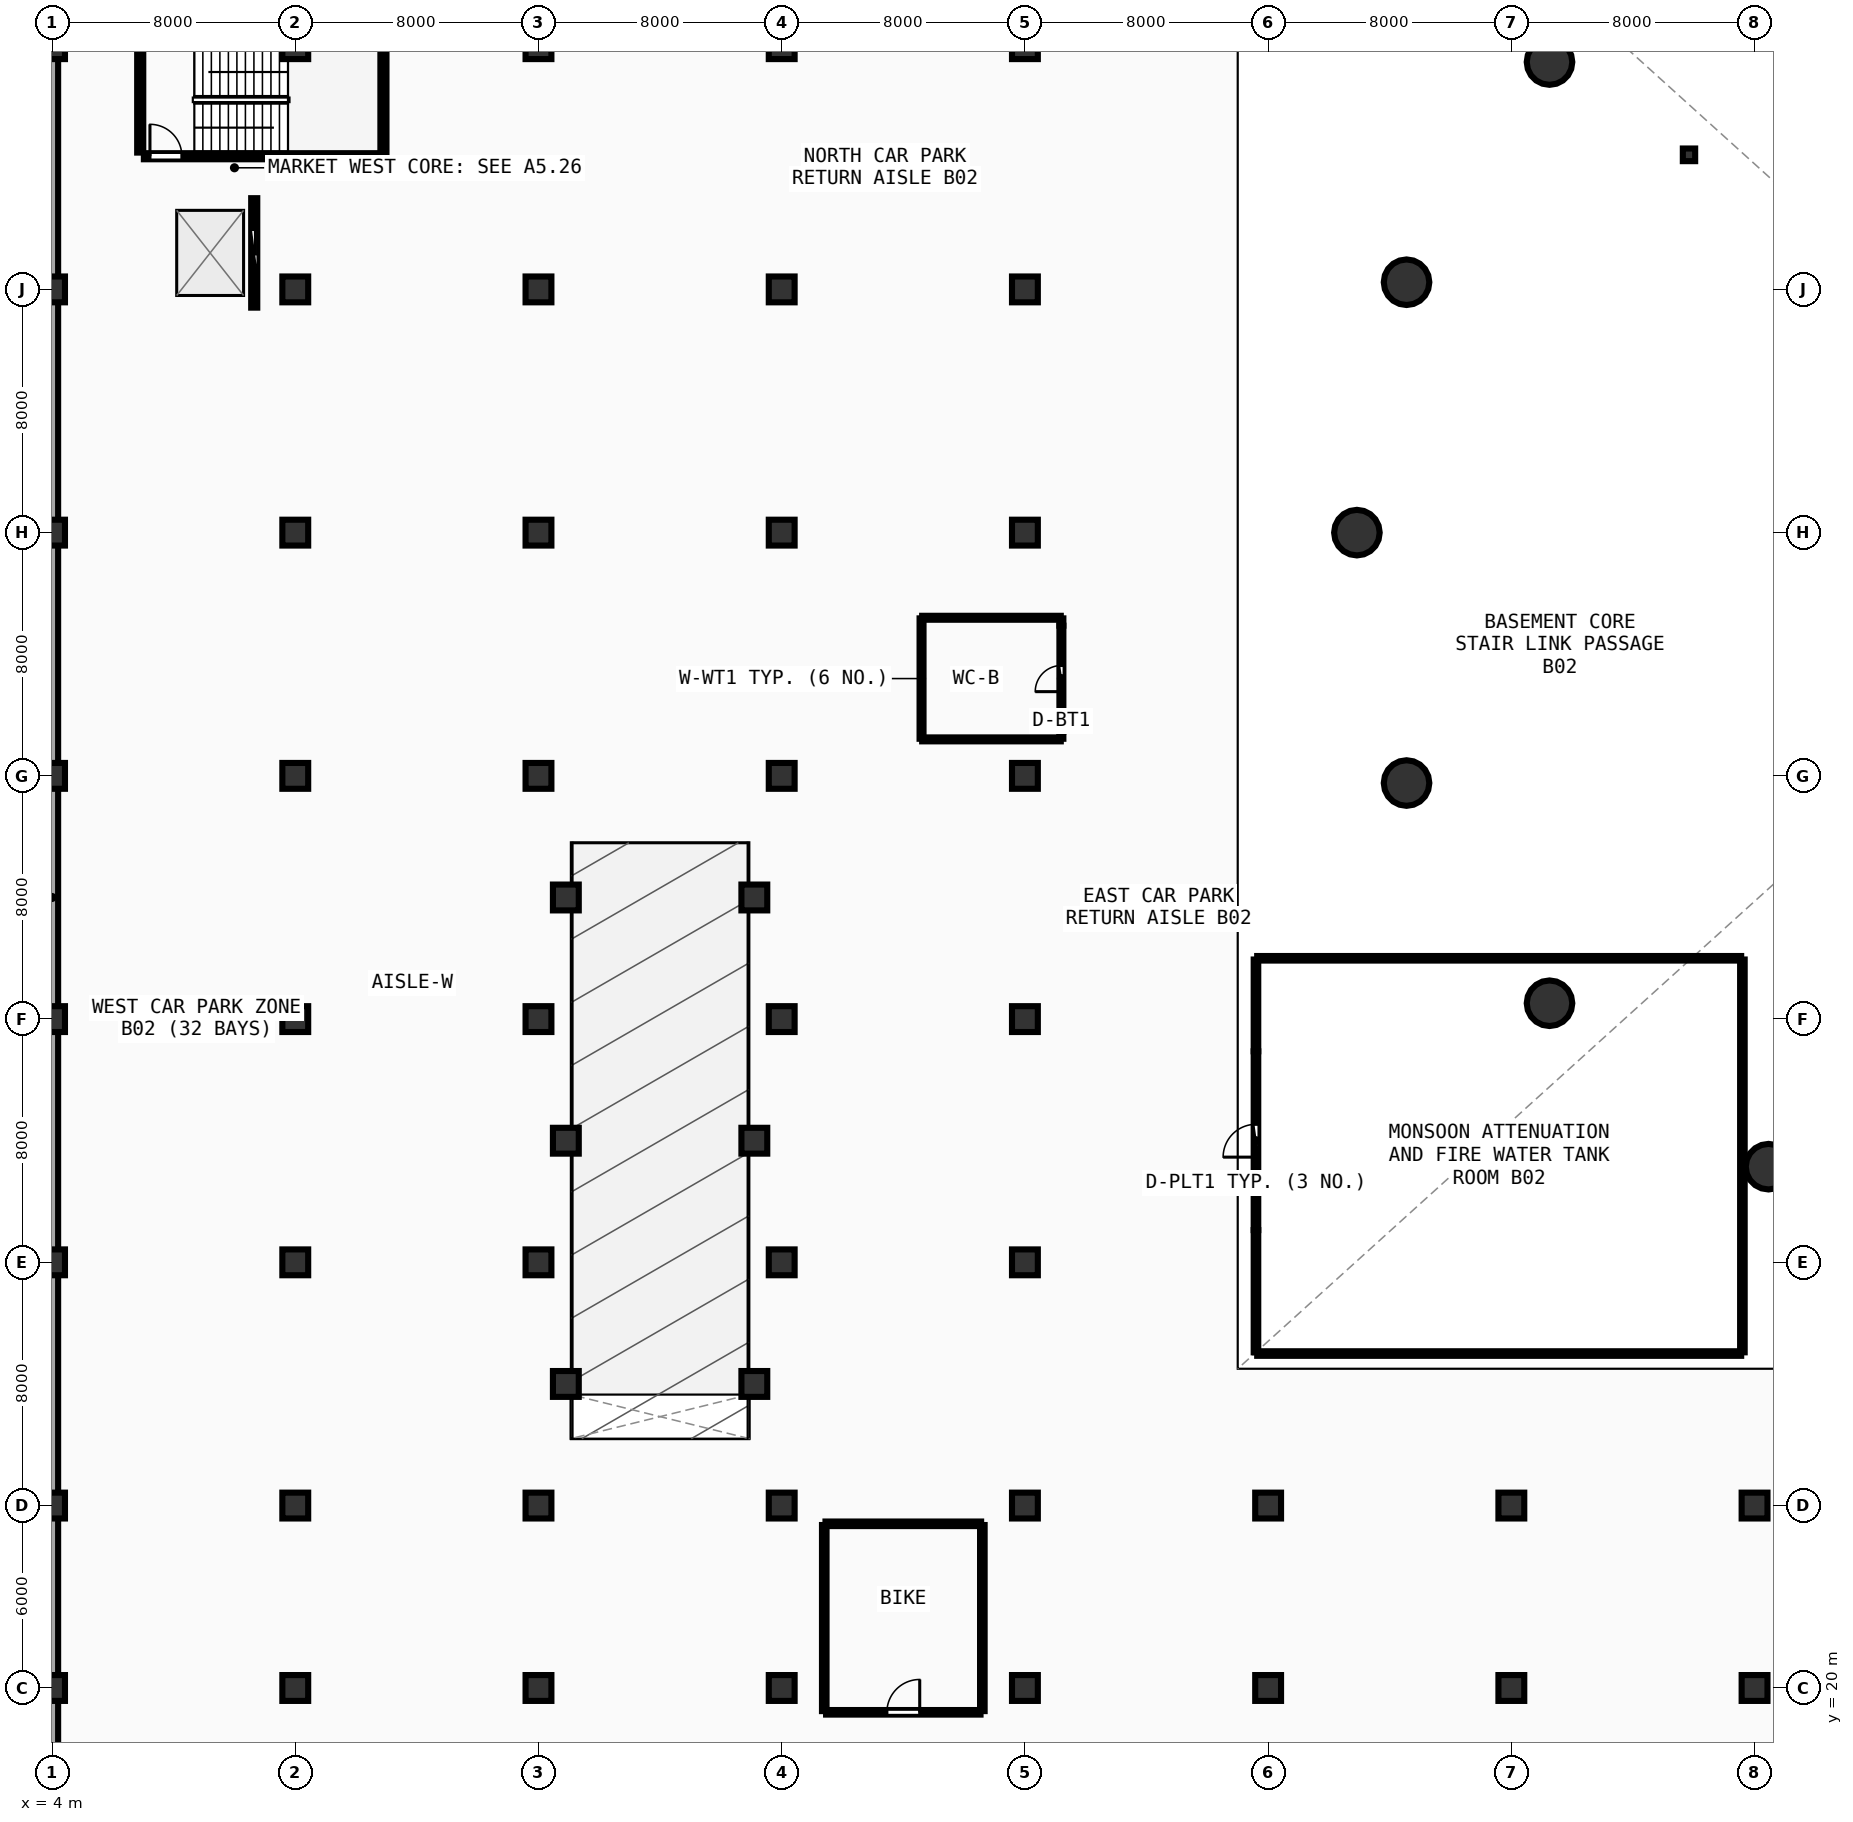
"""IFC4 building model, lengths in metres.
Left out: names, types, materials, properties, quantities, classifications, styles, units other than length and angle.
Written with IfcOpenShell. Run it as: python <this file> out.ifc"""

import sys

from ifc_helpers import new_model, si_unit, direction, frame, frame_2d, origin, origin_2d, place, context, subcontext, project, spatial, rectangle, circle, i_section, extrude, element, fill, save


model = new_model("IFC4")
c1 = context("Model", 3, precision=1e-05, world=origin(), true_north=direction((0.0, 1.0)))
c2 = subcontext(c1, "Body", "Model", "MODEL_VIEW")
j1 = project(units=[si_unit("LENGTHUNIT", "METRE"), si_unit("PLANEANGLEUNIT", "RADIAN")], contexts=[c1])
p1 = place(None, origin())
s1 = spatial("IfcSite", under=j1, at=p1, CompositionType="ELEMENT")
p2 = place(p1, origin())
s2 = spatial("IfcBuilding", under=s1, at=p2, CompositionType="ELEMENT")
p3 = place(p2, frame((0.0, 0.0, -8.4)))
s3 = spatial("IfcBuildingStorey", under=s2, at=p3, CompositionType="ELEMENT", Elevation=-8.4)
for number, where, z_axis, x_axis in (
    (1, (53.256, 73.478, 0.0), (0.0, 0.0, 1.0), (1.0, 0.0, 0.0)),
    (2, (48.553, 66.236, 0.0), (0.0, 0.0, 1.0), (1.0, 0.0, 0.0)),
    (3, (46.92, 58.0, 0.0), (0.0, 0.0, 1.0), (1.0, 0.0, 0.0)),
    (4, (48.553, 49.764, 0.0), (0.0, 0.0, 1.0), (1.0, 0.0, 0.0)),
    (5, (53.256, 42.522, 0.0), (0.0, 0.0, 1.0), (1.0, 0.0, 0.0)),
    (6, (60.46, 37.146, 0.0), (0.0, 0.0, 1.0), (1.0, 0.0, 0.0)),
):
    element("IfcColumn", number, at=place(p3, frame(where, z_axis=z_axis, x_axis=x_axis)), inside=s3, PredefinedType="COLUMN", context=c2, shape_type="SweptSolid", body=[
        extrude(circle(Radius=0.75, at=origin_2d()), origin(), (0.0, 0.0, 1.0), 4.2),
    ])
p4 = place(p3, frame((57.844, 70.426, 0.0), z_axis=(0.0, 0.0, 1.0), x_axis=(1.0, 0.0, 0.0)))
e7 = element("IfcColumn", 7, at=p4, inside=s3, PredefinedType="COLUMN", context=c2, shape_type="SweptSolid", body=[
    extrude(i_section(OverallWidth=0.406, OverallDepth=0.416, WebThickness=0.029, FlangeThickness=0.048, FilletRadius=0.015, at=origin_2d()), origin(), (0.0, 0.0, 1.0), 4.2),
])
for number, where, z_axis, x_axis in (
    (8, (4.0, 20.0, 0.0), (0.0, 0.0, 1.0), (1.0, 0.0, 0.0)),
    (9, (4.0, 26.0, 0.0), (0.0, 0.0, 1.0), (1.0, 0.0, 0.0)),
    (10, (4.0, 34.0, 0.0), (0.0, 0.0, 1.0), (1.0, 0.0, 0.0)),
    (11, (4.0, 42.0, 0.0), (0.0, 0.0, 1.0), (1.0, 0.0, 0.0)),
    (12, (4.0, 50.0, 0.0), (0.0, 0.0, 1.0), (1.0, 0.0, 0.0)),
    (13, (4.0, 58.0, 0.0), (0.0, 0.0, 1.0), (1.0, 0.0, 0.0)),
    (14, (4.0, 66.0, 0.0), (0.0, 0.0, 1.0), (1.0, 0.0, 0.0)),
    (15, (4.0, 74.0, 0.0), (0.0, 0.0, 1.0), (1.0, 0.0, 0.0)),
    (16, (12.0, 20.0, 0.0), (0.0, 0.0, 1.0), (1.0, 0.0, 0.0)),
    (17, (12.0, 26.0, 0.0), (0.0, 0.0, 1.0), (1.0, 0.0, 0.0)),
    (18, (12.0, 34.0, 0.0), (0.0, 0.0, 1.0), (1.0, 0.0, 0.0)),
    (19, (12.0, 42.0, 0.0), (0.0, 0.0, 1.0), (1.0, 0.0, 0.0)),
    (20, (12.0, 50.0, 0.0), (0.0, 0.0, 1.0), (1.0, 0.0, 0.0)),
    (21, (12.0, 58.0, 0.0), (0.0, 0.0, 1.0), (1.0, 0.0, 0.0)),
    (22, (12.0, 66.0, 0.0), (0.0, 0.0, 1.0), (1.0, 0.0, 0.0)),
    (23, (12.0, 74.0, 0.0), (0.0, 0.0, 1.0), (1.0, 0.0, 0.0)),
    (24, (20.0, 20.0, 0.0), (0.0, 0.0, 1.0), (1.0, 0.0, 0.0)),
    (25, (20.0, 26.0, 0.0), (0.0, 0.0, 1.0), (1.0, 0.0, 0.0)),
    (26, (20.0, 34.0, 0.0), (0.0, 0.0, 1.0), (1.0, 0.0, 0.0)),
    (27, (20.0, 42.0, 0.0), (0.0, 0.0, 1.0), (1.0, 0.0, 0.0)),
    (28, (20.0, 50.0, 0.0), (0.0, 0.0, 1.0), (1.0, 0.0, 0.0)),
    (29, (20.0, 58.0, 0.0), (0.0, 0.0, 1.0), (1.0, 0.0, 0.0)),
    (30, (20.0, 66.0, 0.0), (0.0, 0.0, 1.0), (1.0, 0.0, 0.0)),
    (31, (20.0, 74.0, 0.0), (0.0, 0.0, 1.0), (1.0, 0.0, 0.0)),
    (32, (28.0, 20.0, 0.0), (0.0, 0.0, 1.0), (1.0, 0.0, 0.0)),
    (33, (28.0, 26.0, 0.0), (0.0, 0.0, 1.0), (1.0, 0.0, 0.0)),
    (34, (28.0, 34.0, 0.0), (0.0, 0.0, 1.0), (1.0, 0.0, 0.0)),
    (35, (28.0, 42.0, 0.0), (0.0, 0.0, 1.0), (1.0, 0.0, 0.0)),
    (36, (28.0, 50.0, 0.0), (0.0, 0.0, 1.0), (1.0, 0.0, 0.0)),
    (37, (28.0, 58.0, 0.0), (0.0, 0.0, 1.0), (1.0, 0.0, 0.0)),
    (38, (28.0, 66.0, 0.0), (0.0, 0.0, 1.0), (1.0, 0.0, 0.0)),
    (39, (28.0, 74.0, 0.0), (0.0, 0.0, 1.0), (1.0, 0.0, 0.0)),
    (40, (36.0, 20.0, 0.0), (0.0, 0.0, 1.0), (1.0, 0.0, 0.0)),
    (41, (36.0, 26.0, 0.0), (0.0, 0.0, 1.0), (1.0, 0.0, 0.0)),
    (42, (36.0, 34.0, 0.0), (0.0, 0.0, 1.0), (1.0, 0.0, 0.0)),
    (43, (36.0, 42.0, 0.0), (0.0, 0.0, 1.0), (1.0, 0.0, 0.0)),
    (44, (36.0, 50.0, 0.0), (0.0, 0.0, 1.0), (1.0, 0.0, 0.0)),
    (45, (36.0, 58.0, 0.0), (0.0, 0.0, 1.0), (1.0, 0.0, 0.0)),
    (46, (36.0, 66.0, 0.0), (0.0, 0.0, 1.0), (1.0, 0.0, 0.0)),
    (47, (36.0, 74.0, 0.0), (0.0, 0.0, 1.0), (1.0, 0.0, 0.0)),
    (48, (44.0, 20.0, 0.0), (0.0, 0.0, 1.0), (1.0, 0.0, 0.0)),
    (49, (44.0, 26.0, 0.0), (0.0, 0.0, 1.0), (1.0, 0.0, 0.0)),
    (50, (52.0, 20.0, 0.0), (0.0, 0.0, 1.0), (1.0, 0.0, 0.0)),
    (51, (52.0, 26.0, 0.0), (0.0, 0.0, 1.0), (1.0, 0.0, 0.0)),
    (52, (60.0, 20.0, 0.0), (0.0, 0.0, 1.0), (1.0, 0.0, 0.0)),
    (53, (60.0, 26.0, 0.0), (0.0, 0.0, 1.0), (1.0, 0.0, 0.0)),
    (54, (20.9, 46.0, 0.0), (0.0, 0.0, 1.0), (1.0, 0.0, 0.0)),
    (55, (27.1, 46.0, 0.0), (0.0, 0.0, 1.0), (1.0, 0.0, 0.0)),
    (56, (20.9, 38.0, 0.0), (0.0, 0.0, 1.0), (1.0, 0.0, 0.0)),
    (57, (27.1, 38.0, 0.0), (0.0, 0.0, 1.0), (1.0, 0.0, 0.0)),
    (58, (20.9, 30.0, 0.0), (0.0, 0.0, 1.0), (1.0, 0.0, 0.0)),
    (59, (27.1, 30.0, 0.0), (0.0, 0.0, 1.0), (1.0, 0.0, 0.0)),
):
    element("IfcColumn", number, at=place(p3, frame(where, z_axis=z_axis, x_axis=x_axis)), inside=s3, PredefinedType="COLUMN", context=c2, shape_type="SweptSolid", body=[
        extrude(rectangle(XDim=0.85, YDim=0.85, at=origin_2d()), origin(), (0.0, 0.0, 1.0), 4.2),
    ])
p5 = place(p3, frame((4.0, 87.45, 0.0), z_axis=(0.0, 0.0, 1.0), x_axis=(0.0, -1.0, 0.0)))
e60 = element("IfcWall", 60, at=p5, inside=s3, PredefinedType="USERDEFINED", context=c2, shape_type="SweptSolid", body=[
    extrude(rectangle(XDim=82.9, YDim=0.4, at=frame_2d((41.45, 0.0))), origin(), (0.0, 0.0, 1.0), 3.9),
])
p6 = place(p3, frame((7.02, 70.38, 0.0), z_axis=(0.0, 0.0, 1.0), x_axis=(1.0, 0.0, 0.0)))
e61 = element("IfcWall", 61, at=p6, inside=s3, PredefinedType="SHEAR", context=c2, shape_type="SweptSolid", body=[
    extrude(rectangle(XDim=7.76, YDim=0.2, at=frame_2d((3.88, 0.0))), origin(), (0.0, 0.0, 1.0), 3.9),
])
p7 = place(p6, frame((0.2, 0.0, 0.0)))
e62 = element("IfcOpeningElement", 62, at=p7, cuts=e61, PredefinedType="OPENING", context=c2, shape_type="SweptSolid", body=[
    extrude(rectangle(XDim=1.05, YDim=2.1, at=frame_2d((0.525, 1.05))), frame((0.0, 0.11, 0.0), z_axis=(0.0, -1.0, 0.0), x_axis=(1.0, 0.0, 0.0)), (0.0, 0.0, 1.0), 0.22),
])
for number, where, z_axis, x_axis in (
    (63, (14.9, 70.5, 0.0), (0.0, 0.0, 1.0), (0.0, 1.0, 0.0)),
    (64, (6.9, 73.97, 0.0), (0.0, 0.0, 1.0), (0.0, -1.0, 0.0)),
):
    element("IfcWall", number, at=place(p3, frame(where, z_axis=z_axis, x_axis=x_axis)), inside=s3, PredefinedType="SHEAR", context=c2, shape_type="SweptSolid", body=[
        extrude(rectangle(XDim=3.47, YDim=0.2, at=frame_2d((1.735, 0.0))), origin(), (0.0, 0.0, 1.0), 3.9),
    ])
p8 = place(p3, frame((10.65, 65.4, 0.0), z_axis=(0.0, 0.0, 1.0), x_axis=(0.0, 1.0, 0.0)))
e65 = element("IfcWall", 65, at=p8, inside=s3, PredefinedType="SOLIDWALL", context=c2, shape_type="SweptSolid", body=[
    extrude(rectangle(XDim=3.6, YDim=0.2, at=frame_2d((1.8, 0.0))), origin(), (0.0, 0.0, 1.0), 2.685),
])
p9 = place(p8, frame((1.02, 0.0, 0.0)))
e66 = element("IfcOpeningElement", 66, at=p9, cuts=e65, PredefinedType="OPENING", context=c2, shape_type="SweptSolid", body=[
    extrude(rectangle(XDim=1.55, YDim=2.2, at=frame_2d((0.775, 1.1))), frame((0.0, 0.11, 0.0), z_axis=(0.0, -1.0, 0.0), x_axis=(1.0, 0.0, 0.0)), (0.0, 0.0, 1.0), 0.22),
])
p10 = place(p3, frame((29.46, 19.2, 0.0), z_axis=(0.0, 0.0, 1.0), x_axis=(1.0, 0.0, 0.0)))
e67 = element("IfcWall", 67, at=p10, inside=s3, PredefinedType="PARTITIONING", context=c2, shape_type="SweptSolid", body=[
    extrude(rectangle(XDim=5.08, YDim=0.15, at=frame_2d((2.54, 0.0))), origin(), (0.0, 0.0, 1.0), 3.89),
])
p11 = place(p10, frame((2.0, 0.0, 0.0)))
e68 = element("IfcOpeningElement", 68, at=p11, cuts=e67, PredefinedType="OPENING", context=c2, shape_type="SweptSolid", body=[
    extrude(rectangle(XDim=1.08, YDim=2.1, at=frame_2d((0.54, 1.05))), frame((0.0, 0.085, 0.0), z_axis=(0.0, -1.0, 0.0), x_axis=(1.0, 0.0, 0.0)), (0.0, 0.0, 1.0), 0.17),
])
p12 = place(p3, frame((43.6, 35.06, 0.0), z_axis=(0.0, 0.0, 1.0), x_axis=(0.0, 1.0, 0.0)))
e69 = element("IfcWall", 69, at=p12, inside=s3, PredefinedType="PARTITIONING", context=c2, shape_type="SweptSolid", body=[
    extrude(rectangle(XDim=5.88, YDim=0.15, at=frame_2d((2.94, 0.0))), origin(), (0.0, 0.0, 1.0), 3.89),
])
p13 = place(p12, frame((2.4, 0.0, 0.0)))
e70 = element("IfcOpeningElement", 70, at=p13, cuts=e69, PredefinedType="OPENING", context=c2, shape_type="SweptSolid", body=[
    extrude(rectangle(XDim=1.08, YDim=2.1, at=frame_2d((0.54, 1.05))), frame((0.0, 0.085, 0.0), z_axis=(0.0, -1.0, 0.0), x_axis=(1.0, 0.0, 0.0)), (0.0, 0.0, 1.0), 0.17),
])
p14 = place(p3, frame((37.2, 51.46, 0.0), z_axis=(0.0, 0.0, 1.0), x_axis=(0.0, 1.0, 0.0)))
e71 = element("IfcWall", 71, at=p14, inside=s3, PredefinedType="PLUMBINGWALL", context=c2, shape_type="SweptSolid", body=[
    extrude(rectangle(XDim=3.48, YDim=0.13, at=frame_2d((1.74, 0.0))), origin(), (0.0, 0.0, 1.0), 3.89),
])
p15 = place(p14, frame((1.31, 0.0, 0.0)))
e72 = element("IfcOpeningElement", 72, at=p15, cuts=e71, PredefinedType="OPENING", context=c2, shape_type="SweptSolid", body=[
    extrude(rectangle(XDim=0.86, YDim=2.05, at=frame_2d((0.43, 1.025))), frame((0.0, 0.075, 0.0), z_axis=(0.0, -1.0, 0.0), x_axis=(1.0, 0.0, 0.0)), (0.0, 0.0, 1.0), 0.15),
])
p16 = place(p3, frame((34.6, 19.24, 0.0), z_axis=(0.0, 0.0, 1.0), x_axis=(0.0, 1.0, 0.0)))
e73 = element("IfcWall", 73, at=p16, inside=s3, PredefinedType="PARTITIONING", context=c2, shape_type="SweptSolid", body=[
    extrude(rectangle(XDim=6.12, YDim=0.15, at=frame_2d((3.06, 0.0))), origin(), (0.0, 0.0, 1.0), 2.685),
])
p17 = place(p3, frame((34.56, 25.4, 0.0), z_axis=(0.0, 0.0, 1.0), x_axis=(-1.0, 0.0, 0.0)))
e74 = element("IfcWall", 74, at=p17, inside=s3, PredefinedType="PARTITIONING", context=c2, shape_type="SweptSolid", body=[
    extrude(rectangle(XDim=5.12, YDim=0.15, at=frame_2d((2.56, 0.0))), origin(), (0.0, 0.0, 1.0), 3.89),
])
p18 = place(p3, frame((29.4, 25.36, 0.0), z_axis=(0.0, 0.0, 1.0), x_axis=(0.0, -1.0, 0.0)))
e75 = element("IfcWall", 75, at=p18, inside=s3, PredefinedType="PARTITIONING", context=c2, shape_type="SweptSolid", body=[
    extrude(rectangle(XDim=6.12, YDim=0.15, at=frame_2d((3.06, 0.0))), origin(), (0.0, 0.0, 1.0), 2.685),
])
p19 = place(p3, frame((43.64, 31.0, 0.0), z_axis=(0.0, 0.0, 1.0), x_axis=(1.0, 0.0, 0.0)))
e76 = element("IfcWall", 76, at=p19, inside=s3, PredefinedType="PARTITIONING", context=c2, shape_type="SweptSolid", body=[
    extrude(rectangle(XDim=15.92, YDim=0.15, at=frame_2d((7.96, 0.0))), origin(), (0.0, 0.0, 1.0), 3.89),
])
p20 = place(p3, frame((59.6, 31.04, 0.0), z_axis=(0.0, 0.0, 1.0), x_axis=(0.0, 1.0, 0.0)))
e77 = element("IfcWall", 77, at=p20, inside=s3, PredefinedType="PARTITIONING", context=c2, shape_type="SweptSolid", body=[
    extrude(rectangle(XDim=12.92, YDim=0.15, at=frame_2d((6.46, 0.0))), origin(), (0.0, 0.0, 1.0), 3.285),
])
p21 = place(p3, frame((59.56, 44.0, 0.0), z_axis=(0.0, 0.0, 1.0), x_axis=(-1.0, 0.0, 0.0)))
e78 = element("IfcWall", 78, at=p21, inside=s3, PredefinedType="PARTITIONING", context=c2, shape_type="SweptSolid", body=[
    extrude(rectangle(XDim=15.92, YDim=0.15, at=frame_2d((7.96, 0.0))), origin(), (0.0, 0.0, 1.0), 3.285),
])
p22 = place(p3, frame((43.6, 43.96, 0.0), z_axis=(0.0, 0.0, 1.0), x_axis=(0.0, -1.0, 0.0)))
e79 = element("IfcWall", 79, at=p22, inside=s3, PredefinedType="PARTITIONING", context=c2, shape_type="SweptSolid", body=[
    extrude(rectangle(XDim=3.02, YDim=0.15, at=frame_2d((1.51, 0.0))), origin(), (0.0, 0.0, 1.0), 3.89),
])
p23 = place(p3, frame((43.6, 35.06, 0.0), z_axis=(0.0, 0.0, 1.0), x_axis=(0.0, -1.0, 0.0)))
e80 = element("IfcWall", 80, at=p23, inside=s3, PredefinedType="PARTITIONING", context=c2, shape_type="SweptSolid", body=[
    extrude(rectangle(XDim=4.02, YDim=0.15, at=frame_2d((2.01, 0.0))), origin(), (0.0, 0.0, 1.0), 3.89),
])
p24 = place(p3, frame((32.62, 51.2, 0.0), z_axis=(0.0, 0.0, 1.0), x_axis=(1.0, 0.0, 0.0)))
e81 = element("IfcWall", 81, at=p24, inside=s3, PredefinedType="PLUMBINGWALL", context=c2, shape_type="SweptSolid", body=[
    extrude(rectangle(XDim=4.56, YDim=0.13, at=frame_2d((2.28, 0.0))), origin(), (0.0, 0.0, 1.0), 2.685),
])
for number, where, z_axis, x_axis in (
    (82, (37.2, 51.22, 0.0), (0.0, 0.0, 1.0), (0.0, 1.0, 0.0)),
    (83, (37.2, 54.94, 0.0), (0.0, 0.0, 1.0), (0.0, 1.0, 0.0)),
):
    element("IfcWall", number, at=place(p3, frame(where, z_axis=z_axis, x_axis=x_axis)), inside=s3, PredefinedType="PLUMBINGWALL", context=c2, shape_type="SweptSolid", body=[
        extrude(rectangle(XDim=0.24, YDim=0.13, at=frame_2d((0.12, 0.0))), origin(), (0.0, 0.0, 1.0), 3.89),
    ])
p25 = place(p3, frame((37.18, 55.2, 0.0), z_axis=(0.0, 0.0, 1.0), x_axis=(-1.0, 0.0, 0.0)))
e84 = element("IfcWall", 84, at=p25, inside=s3, PredefinedType="PLUMBINGWALL", context=c2, shape_type="SweptSolid", body=[
    extrude(rectangle(XDim=4.56, YDim=0.13, at=frame_2d((2.28, 0.0))), origin(), (0.0, 0.0, 1.0), 2.685),
])
p26 = place(p3, frame((32.6, 55.18, 0.0), z_axis=(0.0, 0.0, 1.0), x_axis=(0.0, -1.0, 0.0)))
e85 = element("IfcWall", 85, at=p26, inside=s3, PredefinedType="PLUMBINGWALL", context=c2, shape_type="SweptSolid", body=[
    extrude(rectangle(XDim=3.96, YDim=0.13, at=frame_2d((1.98, 0.0))), origin(), (0.0, 0.0, 1.0), 3.89),
])
p27 = place(p7, origin())
e86 = element("IfcDoor", 86, at=p27, inside=s3, OperationType="SINGLE_SWING_LEFT", PredefinedType="DOOR", context=c2, shape_type="SweptSolid", body=[
    extrude(rectangle(XDim=1.05, YDim=2.1, at=frame_2d((0.525, 1.05))), frame((0.0, 0.025, 0.0), z_axis=(0.0, -1.0, 0.0), x_axis=(1.0, 0.0, 0.0)), (0.0, 0.0, 1.0), 0.05),
])
fill(e62, e86)
p28 = place(p9, origin())
e87 = element("IfcDoor", 87, at=p28, inside=s3, OperationType="DOUBLE_DOOR_SLIDING", PredefinedType="DOOR", context=c2, shape_type="SweptSolid", body=[
    extrude(rectangle(XDim=1.55, YDim=2.2, at=frame_2d((0.775, 1.1))), frame((0.0, 0.025, 0.0), z_axis=(0.0, -1.0, 0.0), x_axis=(1.0, 0.0, 0.0)), (0.0, 0.0, 1.0), 0.05),
])
fill(e66, e87)
p29 = place(p11, origin())
e88 = element("IfcDoor", 88, at=p29, inside=s3, OperationType="SINGLE_SWING_RIGHT", PredefinedType="DOOR", context=c2, shape_type="SweptSolid", body=[
    extrude(rectangle(XDim=1.08, YDim=2.1, at=frame_2d((0.54, 1.05))), frame((0.0, 0.025, 0.0), z_axis=(0.0, -1.0, 0.0), x_axis=(1.0, 0.0, 0.0)), (0.0, 0.0, 1.0), 0.05),
])
fill(e68, e88)
p30 = place(p13, origin())
e89 = element("IfcDoor", 89, at=p30, inside=s3, OperationType="SINGLE_SWING_LEFT", PredefinedType="DOOR", context=c2, shape_type="SweptSolid", body=[
    extrude(rectangle(XDim=1.08, YDim=2.1, at=frame_2d((0.54, 1.05))), frame((0.0, 0.025, 0.0), z_axis=(0.0, -1.0, 0.0), x_axis=(1.0, 0.0, 0.0)), (0.0, 0.0, 1.0), 0.05),
])
fill(e70, e89)
p31 = place(p15, origin())
e90 = element("IfcDoor", 90, at=p31, inside=s3, OperationType="SINGLE_SWING_LEFT", PredefinedType="DOOR", context=c2, shape_type="SweptSolid", body=[
    extrude(rectangle(XDim=0.86, YDim=2.05, at=frame_2d((0.43, 1.025))), frame((0.0, 0.025, 0.0), z_axis=(0.0, -1.0, 0.0), x_axis=(1.0, 0.0, 0.0)), (0.0, 0.0, 1.0), 0.05),
])
fill(e72, e90)
save(model, sys.argv[1])
